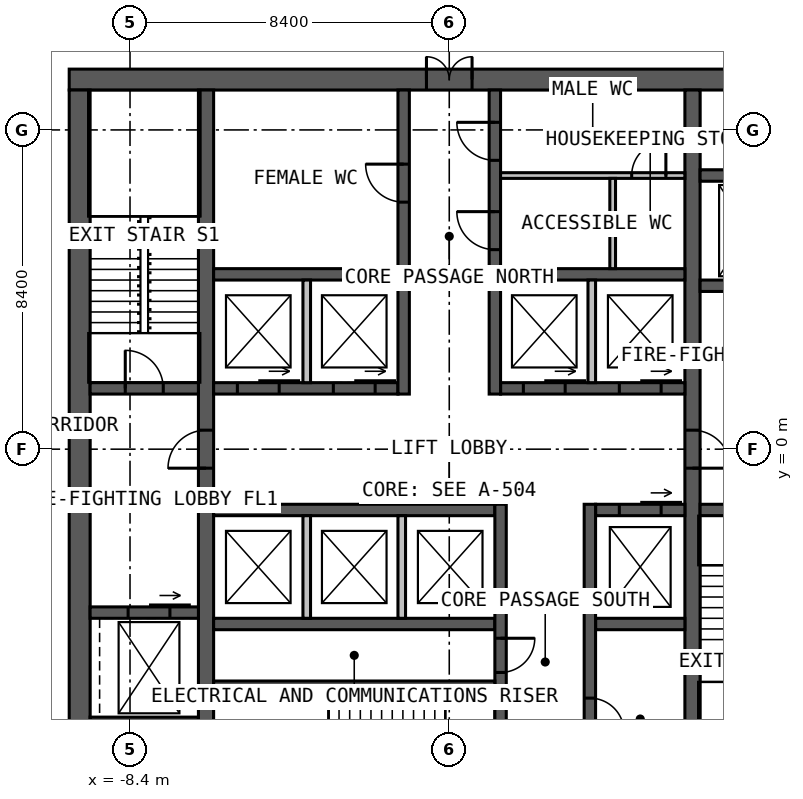
"""IFC4 building model, lengths in metres.
Left out: names, types, materials, properties, quantities, classifications, styles, units other than length and angle.
Written with IfcOpenShell. Run it as: python <this file> out.ifc"""

import sys

from ifc_helpers import new_model, si_unit, direction, frame, frame_2d, origin, place, context, subcontext, project, spatial, rectangle, extrude, element, fill, save


model = new_model("IFC4")
c1 = context("Model", 3, precision=1e-05, world=origin(), true_north=direction((0.0, 1.0)))
c2 = subcontext(c1, "Body", "Model", "MODEL_VIEW")
j1 = project(units=[si_unit("LENGTHUNIT", "METRE"), si_unit("PLANEANGLEUNIT", "RADIAN")], contexts=[c1])
p1 = place(None, origin())
s1 = spatial("IfcSite", under=j1, at=p1, CompositionType="ELEMENT")
p2 = place(p1, origin())
s2 = spatial("IfcBuilding", under=s1, at=p2, CompositionType="ELEMENT")
p3 = place(p2, frame((0.0, 0.0, 118.0)))
s3 = spatial("IfcBuildingStorey", under=s2, at=p3, CompositionType="ELEMENT", Elevation=118.0)
p4 = place(p3, frame((-10.0, 9.725, 0.0), z_axis=(0.0, 0.0, 1.0), x_axis=(1.0, 0.0, 0.0)))
e1 = element("IfcWall", 1, at=p4, inside=s3, PredefinedType="SOLIDWALL", context=c2, shape_type="SweptSolid", body=[
    extrude(rectangle(XDim=20.0, YDim=0.55, at=frame_2d((10.0, 0.0))), origin(), (0.0, 0.0, 1.0), 4.0),
])
p5 = place(p4, frame((9.4, 0.0, 0.0)))
e2 = element("IfcOpeningElement", 2, at=p5, cuts=e1, PredefinedType="OPENING", context=c2, shape_type="SweptSolid", body=[
    extrude(rectangle(XDim=1.2, YDim=2.2, at=frame_2d((0.6, 1.1))), frame((0.0, 0.285, 0.0), z_axis=(0.0, -1.0, 0.0), x_axis=(1.0, 0.0, 0.0)), (0.0, 0.0, 1.0), 0.57),
])
p6 = place(p3, frame((-9.725, 9.45, 0.0), z_axis=(0.0, 0.0, 1.0), x_axis=(0.0, -1.0, 0.0)))
e3 = element("IfcWall", 3, at=p6, inside=s3, PredefinedType="SOLIDWALL", context=c2, shape_type="SweptSolid", body=[
    extrude(rectangle(XDim=18.9, YDim=0.55, at=frame_2d((9.45, 0.0))), origin(), (0.0, 0.0, 1.0), 4.0),
])
p7 = place(p3, frame((-6.4, -9.45, 0.0), z_axis=(0.0, 0.0, 1.0), x_axis=(0.0, 1.0, 0.0)))
e4 = element("IfcWall", 4, at=p7, inside=s3, PredefinedType="SOLIDWALL", context=c2, shape_type="SweptSolid", body=[
    extrude(rectangle(XDim=18.9, YDim=0.4, at=frame_2d((9.45, 0.0))), origin(), (0.0, 0.0, 1.0), 4.0),
])
p8 = place(p7, frame((8.95, 0.0, 0.0)))
e5 = element("IfcOpeningElement", 5, at=p8, cuts=e4, PredefinedType="OPENING", context=c2, shape_type="SweptSolid", body=[
    extrude(rectangle(XDim=1.0, YDim=2.2, at=frame_2d((0.5, 1.1))), frame((0.0, 0.21, 0.0), z_axis=(0.0, -1.0, 0.0), x_axis=(1.0, 0.0, 0.0)), (0.0, 0.0, 1.0), 0.42),
])
p9 = place(p3, frame((6.4, 9.45, 0.0), z_axis=(0.0, 0.0, 1.0), x_axis=(0.0, -1.0, 0.0)))
e6 = element("IfcWall", 6, at=p9, inside=s3, PredefinedType="SOLIDWALL", context=c2, shape_type="SweptSolid", body=[
    extrude(rectangle(XDim=18.9, YDim=0.4, at=frame_2d((9.45, 0.0))), origin(), (0.0, 0.0, 1.0), 4.0),
])
p10 = place(p9, frame((8.95, 0.0, 0.0)))
e7 = element("IfcOpeningElement", 7, at=p10, cuts=e6, PredefinedType="OPENING", context=c2, shape_type="SweptSolid", body=[
    extrude(rectangle(XDim=1.0, YDim=2.2, at=frame_2d((0.5, 1.1))), frame((0.0, 0.21, 0.0), z_axis=(0.0, -1.0, 0.0), x_axis=(1.0, 0.0, 0.0)), (0.0, 0.0, 1.0), 0.42),
])
p11 = place(p3, frame((-6.2, 1.6, 0.0), z_axis=(0.0, 0.0, 1.0), x_axis=(1.0, 0.0, 0.0)))
e8 = element("IfcWall", 8, at=p11, inside=s3, PredefinedType="SOLIDWALL", context=c2, shape_type="SweptSolid", body=[
    extrude(rectangle(XDim=4.85, YDim=0.3, at=frame_2d((2.425, 0.0))), origin(), (0.0, 0.0, 1.0), 4.0),
])
p12 = place(p11, frame((0.625, 0.0, 0.0)))
e9 = element("IfcOpeningElement", 9, at=p12, cuts=e8, PredefinedType="OPENING", context=c2, shape_type="SweptSolid", body=[
    extrude(rectangle(XDim=1.1, YDim=2.2, at=frame_2d((0.55, 1.1))), frame((0.0, 0.16, 0.0), z_axis=(0.0, -1.0, 0.0), x_axis=(1.0, 0.0, 0.0)), (0.0, 0.0, 1.0), 0.32),
])
p13 = place(p11, frame((3.15, 0.0, 0.0)))
e10 = element("IfcOpeningElement", 10, at=p13, cuts=e8, PredefinedType="OPENING", context=c2, shape_type="SweptSolid", body=[
    extrude(rectangle(XDim=1.1, YDim=2.2, at=frame_2d((0.55, 1.1))), frame((0.0, 0.16, 0.0), z_axis=(0.0, -1.0, 0.0), x_axis=(1.0, 0.0, 0.0)), (0.0, 0.0, 1.0), 0.32),
])
p14 = place(p3, frame((1.35, 1.6, 0.0), z_axis=(0.0, 0.0, 1.0), x_axis=(1.0, 0.0, 0.0)))
e11 = element("IfcWall", 11, at=p14, inside=s3, PredefinedType="SOLIDWALL", context=c2, shape_type="SweptSolid", body=[
    extrude(rectangle(XDim=4.85, YDim=0.3, at=frame_2d((2.425, 0.0))), origin(), (0.0, 0.0, 1.0), 4.0),
])
p15 = place(p14, frame((0.6, 0.0, 0.0)))
e12 = element("IfcOpeningElement", 12, at=p15, cuts=e11, PredefinedType="OPENING", context=c2, shape_type="SweptSolid", body=[
    extrude(rectangle(XDim=1.1, YDim=2.2, at=frame_2d((0.55, 1.1))), frame((0.0, 0.16, 0.0), z_axis=(0.0, -1.0, 0.0), x_axis=(1.0, 0.0, 0.0)), (0.0, 0.0, 1.0), 0.32),
])
p16 = place(p14, frame((3.125, 0.0, 0.0)))
e13 = element("IfcOpeningElement", 13, at=p16, cuts=e11, PredefinedType="OPENING", context=c2, shape_type="SweptSolid", body=[
    extrude(rectangle(XDim=1.1, YDim=2.2, at=frame_2d((0.55, 1.1))), frame((0.0, 0.16, 0.0), z_axis=(0.0, -1.0, 0.0), x_axis=(1.0, 0.0, 0.0)), (0.0, 0.0, 1.0), 0.32),
])
for number, where, z_axis, x_axis in (
    (14, (-6.2, 4.6, 0.0), (0.0, 0.0, 1.0), (1.0, 0.0, 0.0)),
    (15, (1.35, 4.6, 0.0), (0.0, 0.0, 1.0), (1.0, 0.0, 0.0)),
):
    element("IfcWall", number, at=place(p3, frame(where, z_axis=z_axis, x_axis=x_axis)), inside=s3, PredefinedType="SOLIDWALL", context=c2, shape_type="SweptSolid", body=[
        extrude(rectangle(XDim=4.85, YDim=0.3, at=frame_2d((2.425, 0.0))), origin(), (0.0, 0.0, 1.0), 4.0),
    ])
p17 = place(p3, frame((-1.2, 1.45, 0.0), z_axis=(0.0, 0.0, 1.0), x_axis=(0.0, 1.0, 0.0)))
e16 = element("IfcWall", 16, at=p17, inside=s3, PredefinedType="SOLIDWALL", context=c2, shape_type="SweptSolid", body=[
    extrude(rectangle(XDim=8.0, YDim=0.3, at=frame_2d((4.0, 0.0))), origin(), (0.0, 0.0, 1.0), 4.0),
])
p18 = place(p17, frame((5.05, 0.0, 0.0)))
e17 = element("IfcOpeningElement", 17, at=p18, cuts=e16, PredefinedType="OPENING", context=c2, shape_type="SweptSolid", body=[
    extrude(rectangle(XDim=1.0, YDim=2.2, at=frame_2d((0.5, 1.1))), frame((0.0, 0.16, 0.0), z_axis=(0.0, -1.0, 0.0), x_axis=(1.0, 0.0, 0.0)), (0.0, 0.0, 1.0), 0.32),
])
p19 = place(p3, frame((1.2, 1.45, 0.0), z_axis=(0.0, 0.0, 1.0), x_axis=(0.0, 1.0, 0.0)))
e18 = element("IfcWall", 18, at=p19, inside=s3, PredefinedType="SOLIDWALL", context=c2, shape_type="SweptSolid", body=[
    extrude(rectangle(XDim=8.0, YDim=0.3, at=frame_2d((4.0, 0.0))), origin(), (0.0, 0.0, 1.0), 4.0),
])
p20 = place(p19, frame((3.8, 0.0, 0.0)))
e19 = element("IfcOpeningElement", 19, at=p20, cuts=e18, PredefinedType="OPENING", context=c2, shape_type="SweptSolid", body=[
    extrude(rectangle(XDim=1.0, YDim=2.2, at=frame_2d((0.5, 1.1))), frame((0.0, 0.16, 0.0), z_axis=(0.0, -1.0, 0.0), x_axis=(1.0, 0.0, 0.0)), (0.0, 0.0, 1.0), 0.32),
])
p21 = place(p19, frame((6.15, 0.0, 0.0)))
e20 = element("IfcOpeningElement", 20, at=p21, cuts=e18, PredefinedType="OPENING", context=c2, shape_type="SweptSolid", body=[
    extrude(rectangle(XDim=1.0, YDim=2.2, at=frame_2d((0.5, 1.1))), frame((0.0, 0.16, 0.0), z_axis=(0.0, -1.0, 0.0), x_axis=(1.0, 0.0, 0.0)), (0.0, 0.0, 1.0), 0.32),
])
p22 = place(p3, frame((-6.2, -1.6, 0.0), z_axis=(0.0, 0.0, 1.0), x_axis=(1.0, 0.0, 0.0)))
e21 = element("IfcWall", 21, at=p22, inside=s3, PredefinedType="SOLIDWALL", context=c2, shape_type="SweptSolid", body=[
    extrude(rectangle(XDim=7.4, YDim=0.3, at=frame_2d((3.7, 0.0))), origin(), (0.0, 0.0, 1.0), 4.0),
])
p23 = place(p3, frame((3.85, -1.6, 0.0), z_axis=(0.0, 0.0, 1.0), x_axis=(1.0, 0.0, 0.0)))
e22 = element("IfcWall", 22, at=p23, inside=s3, PredefinedType="SOLIDWALL", context=c2, shape_type="SweptSolid", body=[
    extrude(rectangle(XDim=2.35, YDim=0.3, at=frame_2d((1.175, 0.0))), origin(), (0.0, 0.0, 1.0), 4.0),
])
p24 = place(p23, frame((0.625, 0.0, 0.0)))
e23 = element("IfcOpeningElement", 23, at=p24, cuts=e22, PredefinedType="OPENING", context=c2, shape_type="SweptSolid", body=[
    extrude(rectangle(XDim=1.1, YDim=2.2, at=frame_2d((0.55, 1.1))), frame((0.0, 0.16, 0.0), z_axis=(0.0, -1.0, 0.0), x_axis=(1.0, 0.0, 0.0)), (0.0, 0.0, 1.0), 0.32),
])
p25 = place(p3, frame((-6.2, -4.6, 0.0), z_axis=(0.0, 0.0, 1.0), x_axis=(1.0, 0.0, 0.0)))
e24 = element("IfcWall", 24, at=p25, inside=s3, PredefinedType="SOLIDWALL", context=c2, shape_type="SweptSolid", body=[
    extrude(rectangle(XDim=7.4, YDim=0.3, at=frame_2d((3.7, 0.0))), origin(), (0.0, 0.0, 1.0), 4.0),
])
p26 = place(p3, frame((3.85, -4.6, 0.0), z_axis=(0.0, 0.0, 1.0), x_axis=(1.0, 0.0, 0.0)))
e25 = element("IfcWall", 25, at=p26, inside=s3, PredefinedType="SOLIDWALL", context=c2, shape_type="SweptSolid", body=[
    extrude(rectangle(XDim=2.35, YDim=0.3, at=frame_2d((1.175, 0.0))), origin(), (0.0, 0.0, 1.0), 4.0),
])
p27 = place(p3, frame((1.35, -1.45, 0.0), z_axis=(0.0, 0.0, 1.0), x_axis=(0.0, -1.0, 0.0)))
e26 = element("IfcWall", 26, at=p27, inside=s3, PredefinedType="SOLIDWALL", context=c2, shape_type="SweptSolid", body=[
    extrude(rectangle(XDim=8.0, YDim=0.3, at=frame_2d((4.0, 0.0))), origin(), (0.0, 0.0, 1.0), 4.0),
])
p28 = place(p27, frame((5.925, 0.0, 0.0)))
e27 = element("IfcOpeningElement", 27, at=p28, cuts=e26, PredefinedType="OPENING", context=c2, shape_type="SweptSolid", body=[
    extrude(rectangle(XDim=1.0, YDim=2.2, at=frame_2d((0.5, 1.1))), frame((0.0, 0.16, 0.0), z_axis=(0.0, -1.0, 0.0), x_axis=(1.0, 0.0, 0.0)), (0.0, 0.0, 1.0), 0.32),
])
p29 = place(p27, frame((3.525, 0.0, 0.0)))
e28 = element("IfcOpeningElement", 28, at=p29, cuts=e26, PredefinedType="OPENING", context=c2, shape_type="SweptSolid", body=[
    extrude(rectangle(XDim=0.9, YDim=2.2, at=frame_2d((0.45, 1.1))), frame((0.0, 0.16, 0.0), z_axis=(0.0, -1.0, 0.0), x_axis=(1.0, 0.0, 0.0)), (0.0, 0.0, 1.0), 0.32),
])
p30 = place(p3, frame((3.7, -1.45, 0.0), z_axis=(0.0, 0.0, 1.0), x_axis=(0.0, -1.0, 0.0)))
e29 = element("IfcWall", 29, at=p30, inside=s3, PredefinedType="SOLIDWALL", context=c2, shape_type="SweptSolid", body=[
    extrude(rectangle(XDim=8.0, YDim=0.3, at=frame_2d((4.0, 0.0))), origin(), (0.0, 0.0, 1.0), 4.0),
])
p31 = place(p30, frame((5.1, 0.0, 0.0)))
e30 = element("IfcOpeningElement", 30, at=p31, cuts=e29, PredefinedType="OPENING", context=c2, shape_type="SweptSolid", body=[
    extrude(rectangle(XDim=0.9, YDim=2.2, at=frame_2d((0.45, 1.1))), frame((0.0, 0.16, 0.0), z_axis=(0.0, -1.0, 0.0), x_axis=(1.0, 0.0, 0.0)), (0.0, 0.0, 1.0), 0.32),
])
p32 = place(p3, frame((-6.2, -6.2, 0.0), z_axis=(0.0, 0.0, 1.0), x_axis=(1.0, 0.0, 0.0)))
e31 = element("IfcWall", 31, at=p32, inside=s3, PredefinedType="SOLIDWALL", context=c2, shape_type="SweptSolid", body=[
    extrude(rectangle(XDim=7.4, YDim=0.2, at=frame_2d((3.7, 0.0))), origin(), (0.0, 0.0, 1.0), 4.0),
])
p33 = place(p3, frame((-9.45, 1.6, 0.0), z_axis=(0.0, 0.0, 1.0), x_axis=(1.0, 0.0, 0.0)))
e32 = element("IfcWall", 32, at=p33, inside=s3, PredefinedType="SOLIDWALL", context=c2, shape_type="SweptSolid", body=[
    extrude(rectangle(XDim=2.85, YDim=0.3, at=frame_2d((1.425, 0.0))), origin(), (0.0, 0.0, 1.0), 4.0),
])
p34 = place(p33, frame((0.925, 0.0, 0.0)))
e33 = element("IfcOpeningElement", 33, at=p34, cuts=e32, PredefinedType="OPENING", context=c2, shape_type="SweptSolid", body=[
    extrude(rectangle(XDim=1.0, YDim=2.2, at=frame_2d((0.5, 1.1))), frame((0.0, 0.16, 0.0), z_axis=(0.0, -1.0, 0.0), x_axis=(1.0, 0.0, 0.0)), (0.0, 0.0, 1.0), 0.32),
])
p35 = place(p3, frame((6.6, -1.6, 0.0), z_axis=(0.0, 0.0, 1.0), x_axis=(1.0, 0.0, 0.0)))
e34 = element("IfcWall", 34, at=p35, inside=s3, PredefinedType="SOLIDWALL", context=c2, shape_type="SweptSolid", body=[
    extrude(rectangle(XDim=2.85, YDim=0.3, at=frame_2d((1.425, 0.0))), origin(), (0.0, 0.0, 1.0), 4.0),
])
p36 = place(p35, frame((0.925, 0.0, 0.0)))
e35 = element("IfcOpeningElement", 35, at=p36, cuts=e34, PredefinedType="OPENING", context=c2, shape_type="SweptSolid", body=[
    extrude(rectangle(XDim=1.0, YDim=2.2, at=frame_2d((0.5, 1.1))), frame((0.0, 0.16, 0.0), z_axis=(0.0, -1.0, 0.0), x_axis=(1.0, 0.0, 0.0)), (0.0, 0.0, 1.0), 0.32),
])
p37 = place(p3, frame((-9.45, -4.3, 0.0), z_axis=(0.0, 0.0, 1.0), x_axis=(1.0, 0.0, 0.0)))
e36 = element("IfcWall", 36, at=p37, inside=s3, PredefinedType="SOLIDWALL", context=c2, shape_type="SweptSolid", body=[
    extrude(rectangle(XDim=2.85, YDim=0.3, at=frame_2d((1.425, 0.0))), origin(), (0.0, 0.0, 1.0), 4.0),
])
p38 = place(p37, frame((1.0, 0.0, 0.0)))
e37 = element("IfcOpeningElement", 37, at=p38, cuts=e36, PredefinedType="OPENING", context=c2, shape_type="SweptSolid", body=[
    extrude(rectangle(XDim=1.1, YDim=2.2, at=frame_2d((0.55, 1.1))), frame((0.0, 0.16, 0.0), z_axis=(0.0, -1.0, 0.0), x_axis=(1.0, 0.0, 0.0)), (0.0, 0.0, 1.0), 0.32),
])
p39 = place(p3, frame((6.6, 4.3, 0.0), z_axis=(0.0, 0.0, 1.0), x_axis=(1.0, 0.0, 0.0)))
e38 = element("IfcWall", 38, at=p39, inside=s3, PredefinedType="SOLIDWALL", context=c2, shape_type="SweptSolid", body=[
    extrude(rectangle(XDim=2.85, YDim=0.3, at=frame_2d((1.425, 0.0))), origin(), (0.0, 0.0, 1.0), 4.0),
])
p40 = place(p39, frame((0.75, 0.0, 0.0)))
e39 = element("IfcOpeningElement", 39, at=p40, cuts=e38, PredefinedType="OPENING", context=c2, shape_type="SweptSolid", body=[
    extrude(rectangle(XDim=1.1, YDim=2.2, at=frame_2d((0.55, 1.1))), frame((0.0, 0.16, 0.0), z_axis=(0.0, -1.0, 0.0), x_axis=(1.0, 0.0, 0.0)), (0.0, 0.0, 1.0), 0.32),
])
for number, where, z_axis, x_axis in (
    (40, (-9.45, -7.2, 0.0), (0.0, 0.0, 1.0), (1.0, 0.0, 0.0)),
    (41, (6.6, 7.2, 0.0), (0.0, 0.0, 1.0), (1.0, 0.0, 0.0)),
):
    element("IfcWall", number, at=place(p3, frame(where, z_axis=z_axis, x_axis=x_axis)), inside=s3, PredefinedType="SOLIDWALL", context=c2, shape_type="SweptSolid", body=[
        extrude(rectangle(XDim=2.85, YDim=0.3, at=frame_2d((1.425, 0.0))), origin(), (0.0, 0.0, 1.0), 4.0),
    ])
for number, where, z_axis, x_axis in (
    (42, (-3.75, 1.75, 0.0), (0.0, 0.0, 1.0), (0.0, 1.0, 0.0)),
    (43, (3.75, 1.75, 0.0), (0.0, 0.0, 1.0), (0.0, 1.0, 0.0)),
    (44, (-3.75, -1.75, 0.0), (0.0, 0.0, 1.0), (0.0, -1.0, 0.0)),
    (45, (-1.25, -1.75, 0.0), (0.0, 0.0, 1.0), (0.0, -1.0, 0.0)),
):
    element("IfcWall", number, at=place(p3, frame(where, z_axis=z_axis, x_axis=x_axis)), inside=s3, PredefinedType="SOLIDWALL", context=c2, shape_type="SweptSolid", body=[
        extrude(rectangle(XDim=2.7, YDim=0.2, at=frame_2d((1.35, 0.0))), origin(), (0.0, 0.0, 1.0), 3.75),
    ])
p41 = place(p3, frame((1.35, 7.2, 0.0), z_axis=(0.0, 0.0, 1.0), x_axis=(1.0, 0.0, 0.0)))
e46 = element("IfcWall", 46, at=p41, inside=s3, PredefinedType="PARTITIONING", context=c2, shape_type="SweptSolid", body=[
    extrude(rectangle(XDim=4.85, YDim=0.15, at=frame_2d((2.425, 0.0))), origin(), (0.0, 0.0, 1.0), 3.75),
])
p42 = place(p41, frame((3.45, 0.0, 0.0)))
e47 = element("IfcOpeningElement", 47, at=p42, cuts=e46, PredefinedType="OPENING", context=c2, shape_type="SweptSolid", body=[
    extrude(rectangle(XDim=0.9, YDim=2.2, at=frame_2d((0.45, 1.1))), frame((0.0, 0.085, 0.0), z_axis=(0.0, -1.0, 0.0), x_axis=(1.0, 0.0, 0.0)), (0.0, 0.0, 1.0), 0.17),
])
p43 = place(p3, frame((4.3, 4.75, 0.0), z_axis=(0.0, 0.0, 1.0), x_axis=(0.0, 1.0, 0.0)))
e48 = element("IfcWall", 48, at=p43, inside=s3, PredefinedType="PARTITIONING", context=c2, shape_type="SweptSolid", body=[
    extrude(rectangle(XDim=2.375, YDim=0.15, at=frame_2d((1.188, 0.0))), origin(), (0.0, 0.0, 1.0), 3.75),
])
p44 = place(p5, origin())
e49 = element("IfcDoor", 49, at=p44, inside=s3, OperationType="DOUBLE_DOOR_SINGLE_SWING", PredefinedType="DOOR", context=c2, shape_type="SweptSolid", body=[
    extrude(rectangle(XDim=1.2, YDim=2.2, at=frame_2d((0.6, 1.1))), frame((0.0, 0.025, 0.0), z_axis=(0.0, -1.0, 0.0), x_axis=(1.0, 0.0, 0.0)), (0.0, 0.0, 1.0), 0.05),
])
fill(e2, e49)
p45 = place(p8, origin())
e50 = element("IfcDoor", 50, at=p45, inside=s3, OperationType="SINGLE_SWING_LEFT", PredefinedType="DOOR", context=c2, shape_type="SweptSolid", body=[
    extrude(rectangle(XDim=1.0, YDim=2.2, at=frame_2d((0.5, 1.1))), frame((0.0, 0.025, 0.0), z_axis=(0.0, -1.0, 0.0), x_axis=(1.0, 0.0, 0.0)), (0.0, 0.0, 1.0), 0.05),
])
fill(e5, e50)
p46 = place(p10, origin())
e51 = element("IfcDoor", 51, at=p46, inside=s3, OperationType="SINGLE_SWING_RIGHT", PredefinedType="DOOR", context=c2, shape_type="SweptSolid", body=[
    extrude(rectangle(XDim=1.0, YDim=2.2, at=frame_2d((0.5, 1.1))), frame((0.0, 0.025, 0.0), z_axis=(0.0, -1.0, 0.0), x_axis=(1.0, 0.0, 0.0)), (0.0, 0.0, 1.0), 0.05),
])
fill(e7, e51)
p47 = place(p34, origin())
e52 = element("IfcDoor", 52, at=p47, inside=s3, OperationType="SINGLE_SWING_LEFT", PredefinedType="DOOR", context=c2, shape_type="SweptSolid", body=[
    extrude(rectangle(XDim=1.0, YDim=2.2, at=frame_2d((0.5, 1.1))), frame((0.0, 0.025, 0.0), z_axis=(0.0, -1.0, 0.0), x_axis=(1.0, 0.0, 0.0)), (0.0, 0.0, 1.0), 0.05),
])
fill(e33, e52)
p48 = place(p18, origin())
e53 = element("IfcDoor", 53, at=p48, inside=s3, OperationType="SINGLE_SWING_RIGHT", PredefinedType="DOOR", context=c2, shape_type="SweptSolid", body=[
    extrude(rectangle(XDim=1.0, YDim=2.2, at=frame_2d((0.5, 1.1))), frame((0.0, 0.025, 0.0), z_axis=(0.0, -1.0, 0.0), x_axis=(1.0, 0.0, 0.0)), (0.0, 0.0, 1.0), 0.05),
])
fill(e17, e53)
p49 = place(p20, origin())
e54 = element("IfcDoor", 54, at=p49, inside=s3, OperationType="SINGLE_SWING_RIGHT", PredefinedType="DOOR", context=c2, shape_type="SweptSolid", body=[
    extrude(rectangle(XDim=1.0, YDim=2.2, at=frame_2d((0.5, 1.1))), frame((0.0, 0.025, 0.0), z_axis=(0.0, -1.0, 0.0), x_axis=(1.0, 0.0, 0.0)), (0.0, 0.0, 1.0), 0.05),
])
fill(e19, e54)
p50 = place(p21, origin())
e55 = element("IfcDoor", 55, at=p50, inside=s3, OperationType="SINGLE_SWING_RIGHT", PredefinedType="DOOR", context=c2, shape_type="SweptSolid", body=[
    extrude(rectangle(XDim=1.0, YDim=2.2, at=frame_2d((0.5, 1.1))), frame((0.0, 0.025, 0.0), z_axis=(0.0, -1.0, 0.0), x_axis=(1.0, 0.0, 0.0)), (0.0, 0.0, 1.0), 0.05),
])
fill(e20, e55)
p51 = place(p29, origin())
e56 = element("IfcDoor", 56, at=p51, inside=s3, OperationType="SINGLE_SWING_LEFT", PredefinedType="DOOR", context=c2, shape_type="SweptSolid", body=[
    extrude(rectangle(XDim=0.9, YDim=2.2, at=frame_2d((0.45, 1.1))), frame((0.0, 0.025, 0.0), z_axis=(0.0, -1.0, 0.0), x_axis=(1.0, 0.0, 0.0)), (0.0, 0.0, 1.0), 0.05),
])
fill(e28, e56)
p52 = place(p31, origin())
e57 = element("IfcDoor", 57, at=p52, inside=s3, OperationType="SINGLE_SWING_RIGHT", PredefinedType="DOOR", context=c2, shape_type="SweptSolid", body=[
    extrude(rectangle(XDim=0.9, YDim=2.2, at=frame_2d((0.45, 1.1))), frame((0.0, 0.025, 0.0), z_axis=(0.0, -1.0, 0.0), x_axis=(1.0, 0.0, 0.0)), (0.0, 0.0, 1.0), 0.05),
])
fill(e30, e57)
p53 = place(p42, origin())
e58 = element("IfcDoor", 58, at=p53, inside=s3, OperationType="SINGLE_SWING_RIGHT", PredefinedType="DOOR", context=c2, shape_type="SweptSolid", body=[
    extrude(rectangle(XDim=0.9, YDim=2.2, at=frame_2d((0.45, 1.1))), frame((0.0, 0.025, 0.0), z_axis=(0.0, -1.0, 0.0), x_axis=(1.0, 0.0, 0.0)), (0.0, 0.0, 1.0), 0.05),
])
fill(e47, e58)
p54 = place(p12, origin())
e59 = element("IfcDoor", 59, at=p54, inside=s3, OperationType="SLIDING_TO_LEFT", PredefinedType="DOOR", context=c2, shape_type="SweptSolid", body=[
    extrude(rectangle(XDim=1.1, YDim=2.2, at=frame_2d((0.55, 1.1))), frame((0.0, 0.025, 0.0), z_axis=(0.0, -1.0, 0.0), x_axis=(1.0, 0.0, 0.0)), (0.0, 0.0, 1.0), 0.05),
])
fill(e9, e59)
p55 = place(p13, origin())
e60 = element("IfcDoor", 60, at=p55, inside=s3, OperationType="SLIDING_TO_LEFT", PredefinedType="DOOR", context=c2, shape_type="SweptSolid", body=[
    extrude(rectangle(XDim=1.1, YDim=2.2, at=frame_2d((0.55, 1.1))), frame((0.0, 0.025, 0.0), z_axis=(0.0, -1.0, 0.0), x_axis=(1.0, 0.0, 0.0)), (0.0, 0.0, 1.0), 0.05),
])
fill(e10, e60)
p56 = place(p15, origin())
e61 = element("IfcDoor", 61, at=p56, inside=s3, OperationType="SLIDING_TO_LEFT", PredefinedType="DOOR", context=c2, shape_type="SweptSolid", body=[
    extrude(rectangle(XDim=1.1, YDim=2.2, at=frame_2d((0.55, 1.1))), frame((0.0, 0.025, 0.0), z_axis=(0.0, -1.0, 0.0), x_axis=(1.0, 0.0, 0.0)), (0.0, 0.0, 1.0), 0.05),
])
fill(e12, e61)
p57 = place(p16, origin())
e62 = element("IfcDoor", 62, at=p57, inside=s3, OperationType="SLIDING_TO_LEFT", PredefinedType="DOOR", context=c2, shape_type="SweptSolid", body=[
    extrude(rectangle(XDim=1.1, YDim=2.2, at=frame_2d((0.55, 1.1))), frame((0.0, 0.025, 0.0), z_axis=(0.0, -1.0, 0.0), x_axis=(1.0, 0.0, 0.0)), (0.0, 0.0, 1.0), 0.05),
])
fill(e13, e62)
p58 = place(p24, origin())
e63 = element("IfcDoor", 63, at=p58, inside=s3, OperationType="SLIDING_TO_LEFT", PredefinedType="DOOR", context=c2, shape_type="SweptSolid", body=[
    extrude(rectangle(XDim=1.1, YDim=2.2, at=frame_2d((0.55, 1.1))), frame((0.0, 0.025, 0.0), z_axis=(0.0, -1.0, 0.0), x_axis=(1.0, 0.0, 0.0)), (0.0, 0.0, 1.0), 0.05),
])
fill(e23, e63)
p59 = place(p38, origin())
e64 = element("IfcDoor", 64, at=p59, inside=s3, OperationType="SLIDING_TO_LEFT", PredefinedType="DOOR", context=c2, shape_type="SweptSolid", body=[
    extrude(rectangle(XDim=1.1, YDim=2.2, at=frame_2d((0.55, 1.1))), frame((0.0, 0.025, 0.0), z_axis=(0.0, -1.0, 0.0), x_axis=(1.0, 0.0, 0.0)), (0.0, 0.0, 1.0), 0.05),
])
fill(e37, e64)
save(model, sys.argv[1])
